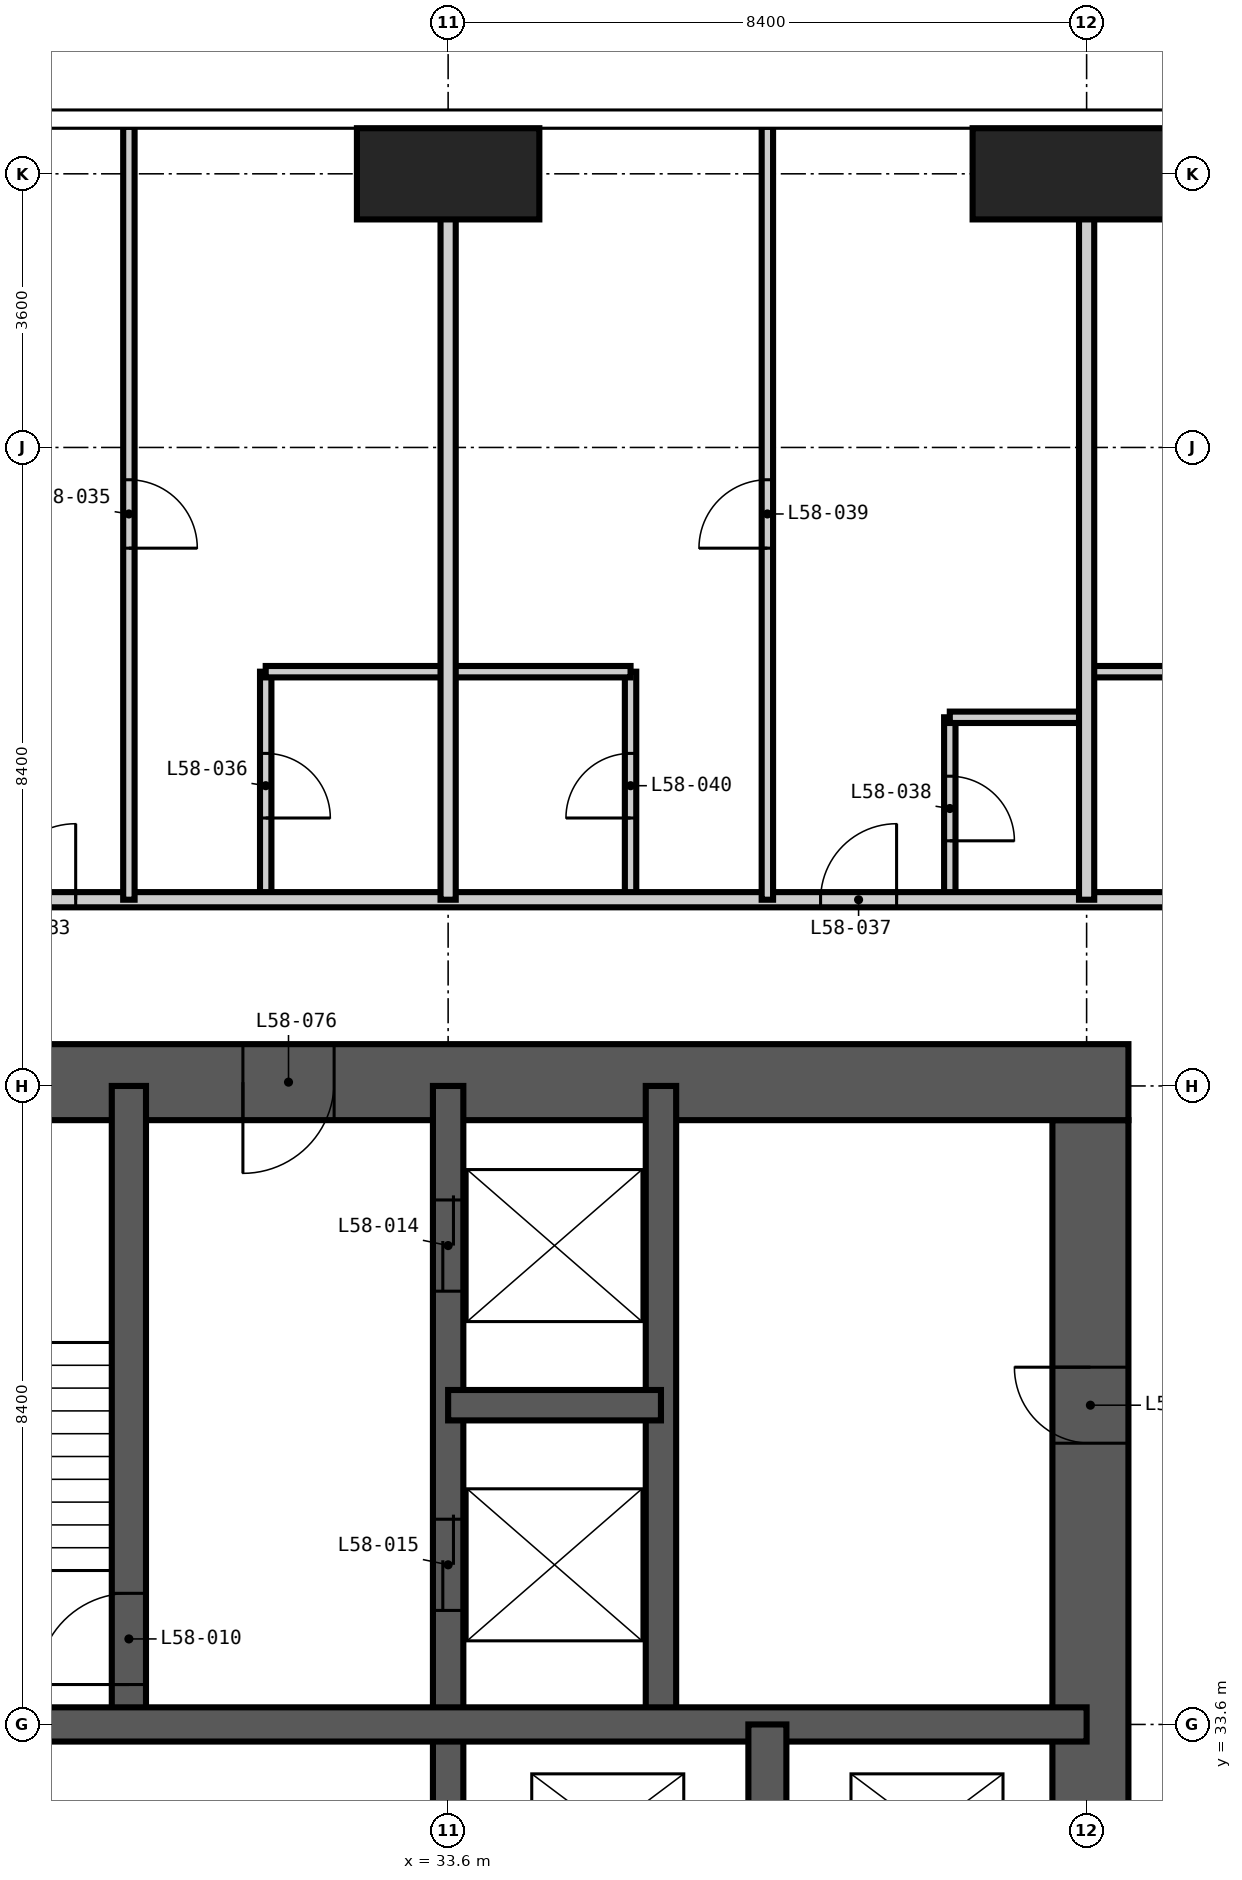
"""IFC4 building model, lengths in metres.
Left out: names, types, materials, properties, quantities, classifications, styles, units other than length and angle.
Written with IfcOpenShell. Run it as: python <this file> out.ifc"""

import sys

from ifc_helpers import new_model, si_unit, direction, frame, frame_2d, origin, origin_2d, place, context, subcontext, project, spatial, rectangle, extrude, element, fill, save


model = new_model("IFC4")
c1 = context("Model", 3, precision=1e-05, world=origin(), true_north=direction((0.0, 1.0)))
c2 = subcontext(c1, "Body", "Model", "MODEL_VIEW")
j1 = project(units=[si_unit("LENGTHUNIT", "METRE"), si_unit("PLANEANGLEUNIT", "RADIAN")], contexts=[c1])
p1 = place(None, origin())
s1 = spatial("IfcSite", under=j1, at=p1, CompositionType="ELEMENT")
p2 = place(p1, origin())
s2 = spatial("IfcBuilding", under=s1, at=p2, CompositionType="ELEMENT")
p3 = place(p2, frame((0.0, 0.0, 225.6)))
s3 = spatial("IfcBuildingStorey", under=s2, at=p3, CompositionType="ELEMENT", Elevation=225.6)
p4 = place(p3, frame((33.6, 54.0, -0.35), z_axis=(0.0, 0.0, 1.0), x_axis=(1.0, 0.0, 0.0)))
e1 = element("IfcColumn", 1, at=p4, inside=s3, PredefinedType="COLUMN", context=c2, shape_type="SweptSolid", body=[
    extrude(rectangle(XDim=2.4, YDim=1.2, at=origin_2d()), origin(), (0.0, 0.0, 1.0), 3.9),
])
p5 = place(p3, frame((42.0, 54.0, -0.35), z_axis=(0.0, 0.0, 1.0), x_axis=(1.0, 0.0, 0.0)))
e2 = element("IfcColumn", 2, at=p5, inside=s3, PredefinedType="COLUMN", context=c2, shape_type="SweptSolid", body=[
    extrude(rectangle(XDim=3.0, YDim=1.2, at=origin_2d()), origin(), (0.0, 0.0, 1.0), 3.9),
])
p6 = place(p3, frame((42.05, 17.25, -0.35), z_axis=(0.0, 0.0, 1.0), x_axis=(0.0, 1.0, 0.0)))
e3 = element("IfcWall", 3, at=p6, inside=s3, PredefinedType="SHEAR", context=c2, shape_type="SweptSolid", body=[
    extrude(rectangle(XDim=24.3, YDim=1.0, at=frame_2d((12.15, 0.0))), origin(), (0.0, 0.0, 1.0), 3.9),
])
p7 = place(p6, frame((0.35, 0.0, 0.35)))
e4 = element("IfcOpeningElement", 4, at=p7, cuts=e3, PredefinedType="OPENING", context=c2, shape_type="SweptSolid", body=[
    extrude(rectangle(XDim=1.2, YDim=2.2, at=frame_2d((0.6, 1.1))), frame((0.0, 0.51, 0.0), z_axis=(0.0, -1.0, 0.0), x_axis=(1.0, 0.0, 0.0)), (0.0, 0.0, 1.0), 1.02),
])
p8 = place(p6, frame((11.25, 0.0, 0.35)))
e5 = element("IfcOpeningElement", 5, at=p8, cuts=e3, PredefinedType="OPENING", context=c2, shape_type="SweptSolid", body=[
    extrude(rectangle(XDim=1.8, YDim=2.2, at=frame_2d((0.9, 1.1))), frame((0.0, 0.51, 0.0), z_axis=(0.0, -1.0, 0.0), x_axis=(1.0, 0.0, 0.0)), (0.0, 0.0, 1.0), 1.02),
])
p9 = place(p6, frame((20.05, 0.0, 0.35)))
e6 = element("IfcOpeningElement", 6, at=p9, cuts=e3, PredefinedType="OPENING", context=c2, shape_type="SweptSolid", body=[
    extrude(rectangle(XDim=1.0, YDim=2.1, at=frame_2d((0.5, 1.05))), frame((0.0, 0.51, 0.0), z_axis=(0.0, -1.0, 0.0), x_axis=(1.0, 0.0, 0.0)), (0.0, 0.0, 1.0), 1.02),
])
p10 = place(p3, frame((42.55, 42.05, -0.35), z_axis=(0.0, 0.0, 1.0), x_axis=(-1.0, 0.0, 0.0)))
e7 = element("IfcWall", 7, at=p10, inside=s3, PredefinedType="SHEAR", context=c2, shape_type="SweptSolid", body=[
    extrude(rectangle(XDim=18.125, YDim=1.0, at=frame_2d((9.062, 0.0))), origin(), (0.0, 0.0, 1.0), 3.9),
])
p11 = place(p10, frame((10.45, 0.0, 0.35)))
e8 = element("IfcOpeningElement", 8, at=p11, cuts=e7, PredefinedType="OPENING", context=c2, shape_type="SweptSolid", body=[
    extrude(rectangle(XDim=1.2, YDim=2.2, at=frame_2d((0.6, 1.1))), frame((0.0, 0.51, 0.0), z_axis=(0.0, -1.0, 0.0), x_axis=(1.0, 0.0, 0.0)), (0.0, 0.0, 1.0), 1.02),
])
p12 = place(p3, frame((33.6, 16.8, -0.35), z_axis=(0.0, 0.0, 1.0), x_axis=(0.0, 1.0, 0.0)))
e9 = element("IfcWall", 9, at=p12, inside=s3, PredefinedType="SHEAR", context=c2, shape_type="SweptSolid", body=[
    extrude(rectangle(XDim=25.2, YDim=0.4, at=frame_2d((12.6, 0.0))), origin(), (0.0, 0.0, 1.0), 3.9),
])
p13 = place(p12, frame((22.5, 0.0, 0.35)))
e10 = element("IfcOpeningElement", 10, at=p13, cuts=e9, PredefinedType="OPENING", context=c2, shape_type="SweptSolid", body=[
    extrude(rectangle(XDim=1.2, YDim=2.2, at=frame_2d((0.6, 1.1))), frame((0.0, 0.21, 0.0), z_axis=(0.0, -1.0, 0.0), x_axis=(1.0, 0.0, 0.0)), (0.0, 0.0, 1.0), 0.42),
])
p14 = place(p12, frame((18.3, 0.0, 0.35)))
e11 = element("IfcOpeningElement", 11, at=p14, cuts=e9, PredefinedType="OPENING", context=c2, shape_type="SweptSolid", body=[
    extrude(rectangle(XDim=1.2, YDim=2.2, at=frame_2d((0.6, 1.1))), frame((0.0, 0.21, 0.0), z_axis=(0.0, -1.0, 0.0), x_axis=(1.0, 0.0, 0.0)), (0.0, 0.0, 1.0), 0.42),
])
p15 = place(p12, frame((9.3, 0.0, 0.35)))
e12 = element("IfcOpeningElement", 12, at=p15, cuts=e9, PredefinedType="OPENING", context=c2, shape_type="SweptSolid", body=[
    extrude(rectangle(XDim=1.0, YDim=2.1, at=frame_2d((0.5, 1.05))), frame((0.0, 0.21, 0.0), z_axis=(0.0, -1.0, 0.0), x_axis=(1.0, 0.0, 0.0)), (0.0, 0.0, 1.0), 0.42),
])
p16 = place(p3, frame((36.4, 33.6, -0.35), z_axis=(0.0, 0.0, 1.0), x_axis=(0.0, 1.0, 0.0)))
e13 = element("IfcWall", 13, at=p16, inside=s3, PredefinedType="SHEAR", context=c2, shape_type="SweptSolid", body=[
    extrude(rectangle(XDim=8.4, YDim=0.4, at=frame_2d((4.2, 0.0))), origin(), (0.0, 0.0, 1.0), 3.9),
])
p17 = place(p3, frame((33.6, 37.8, -0.35), z_axis=(0.0, 0.0, 1.0), x_axis=(1.0, 0.0, 0.0)))
e14 = element("IfcWall", 14, at=p17, inside=s3, PredefinedType="SHEAR", context=c2, shape_type="SweptSolid", body=[
    extrude(rectangle(XDim=2.8, YDim=0.4, at=frame_2d((1.4, 0.0))), origin(), (0.0, 0.0, 1.0), 3.9),
])
p18 = place(p3, frame((29.4, 33.6, -0.35), z_axis=(0.0, 0.0, 1.0), x_axis=(0.0, 1.0, 0.0)))
e15 = element("IfcWall", 15, at=p18, inside=s3, PredefinedType="SHEAR", context=c2, shape_type="SweptSolid", body=[
    extrude(rectangle(XDim=8.4, YDim=0.45, at=frame_2d((4.2, 0.0))), origin(), (0.0, 0.0, 1.0), 3.9),
])
p19 = place(p18, frame((0.525, 0.0, 0.35)))
e16 = element("IfcOpeningElement", 16, at=p19, cuts=e15, PredefinedType="OPENING", context=c2, shape_type="SweptSolid", body=[
    extrude(rectangle(XDim=1.2, YDim=2.2, at=frame_2d((0.6, 1.1))), frame((0.0, 0.235, 0.0), z_axis=(0.0, -1.0, 0.0), x_axis=(1.0, 0.0, 0.0)), (0.0, 0.0, 1.0), 0.47),
])
p20 = place(p3, frame((25.2, 33.6, -0.35), z_axis=(0.0, 0.0, 1.0), x_axis=(1.0, 0.0, 0.0)))
e17 = element("IfcWall", 17, at=p20, inside=s3, PredefinedType="SHEAR", context=c2, shape_type="SweptSolid", body=[
    extrude(rectangle(XDim=16.8, YDim=0.45, at=frame_2d((8.4, 0.0))), origin(), (0.0, 0.0, 1.0), 3.9),
])
p21 = place(p3, frame((37.8, 30.8, -0.35), z_axis=(0.0, 0.0, 1.0), x_axis=(0.0, 1.0, 0.0)))
e18 = element("IfcWall", 18, at=p21, inside=s3, PredefinedType="SHEAR", context=c2, shape_type="SweptSolid", body=[
    extrude(rectangle(XDim=2.8, YDim=0.5, at=frame_2d((1.4, 0.0))), origin(), (0.0, 0.0, 1.0), 3.9),
])
p22 = place(p3, frame((31.2, 44.45, 0.0), z_axis=(0.0, 0.0, 1.0), x_axis=(0.0, 1.0, 0.0)))
e19 = element("IfcWall", 19, at=p22, inside=s3, PredefinedType="PARTITIONING", context=c2, shape_type="SweptSolid", body=[
    extrude(rectangle(XDim=3.0, YDim=0.15, at=frame_2d((1.5, 0.0))), origin(), (0.0, 0.0, 1.0), 3.55),
])
p23 = place(p22, frame((1.075, 0.0, 0.0)))
e20 = element("IfcOpeningElement", 20, at=p23, cuts=e19, PredefinedType="OPENING", context=c2, shape_type="SweptSolid", body=[
    extrude(rectangle(XDim=0.85, YDim=2.1, at=frame_2d((0.425, 1.05))), frame((0.0, 0.085, 0.0), z_axis=(0.0, -1.0, 0.0), x_axis=(1.0, 0.0, 0.0)), (0.0, 0.0, 1.0), 0.17),
])
p24 = place(p3, frame((36.0, 44.45, 0.0), z_axis=(0.0, 0.0, 1.0), x_axis=(0.0, 1.0, 0.0)))
e21 = element("IfcWall", 21, at=p24, inside=s3, PredefinedType="PARTITIONING", context=c2, shape_type="SweptSolid", body=[
    extrude(rectangle(XDim=3.0, YDim=0.15, at=frame_2d((1.5, 0.0))), origin(), (0.0, 0.0, 1.0), 3.55),
])
p25 = place(p24, frame((1.075, 0.0, 0.0)))
e22 = element("IfcOpeningElement", 22, at=p25, cuts=e21, PredefinedType="OPENING", context=c2, shape_type="SweptSolid", body=[
    extrude(rectangle(XDim=0.85, YDim=2.1, at=frame_2d((0.425, 1.05))), frame((0.0, 0.085, 0.0), z_axis=(0.0, -1.0, 0.0), x_axis=(1.0, 0.0, 0.0)), (0.0, 0.0, 1.0), 0.17),
])
p26 = place(p3, frame((40.2, 44.45, 0.0), z_axis=(0.0, 0.0, 1.0), x_axis=(0.0, 1.0, 0.0)))
e23 = element("IfcWall", 23, at=p26, inside=s3, PredefinedType="PARTITIONING", context=c2, shape_type="SweptSolid", body=[
    extrude(rectangle(XDim=2.4, YDim=0.15, at=frame_2d((1.2, 0.0))), origin(), (0.0, 0.0, 1.0), 3.55),
])
p27 = place(p26, frame((0.775, 0.0, 0.0)))
e24 = element("IfcOpeningElement", 24, at=p27, cuts=e23, PredefinedType="OPENING", context=c2, shape_type="SweptSolid", body=[
    extrude(rectangle(XDim=0.85, YDim=2.1, at=frame_2d((0.425, 1.05))), frame((0.0, 0.085, 0.0), z_axis=(0.0, -1.0, 0.0), x_axis=(1.0, 0.0, 0.0)), (0.0, 0.0, 1.0), 0.17),
])
p28 = place(p3, frame((40.2, 46.85, 0.0), z_axis=(0.0, 0.0, 1.0), x_axis=(1.0, 0.0, 0.0)))
e25 = element("IfcWall", 25, at=p28, inside=s3, PredefinedType="PARTITIONING", context=c2, shape_type="SweptSolid", body=[
    extrude(rectangle(XDim=1.8, YDim=0.15, at=frame_2d((0.9, 0.0))), origin(), (0.0, 0.0, 1.0), 3.55),
])
p29 = place(p3, frame((31.2, 47.45, 0.0), z_axis=(0.0, 0.0, 1.0), x_axis=(1.0, 0.0, 0.0)))
e26 = element("IfcWall", 26, at=p29, inside=s3, PredefinedType="PARTITIONING", context=c2, shape_type="SweptSolid", body=[
    extrude(rectangle(XDim=4.8, YDim=0.15, at=frame_2d((2.4, 0.0))), origin(), (0.0, 0.0, 1.0), 3.55),
])
p30 = place(p3, frame((42.0, 47.45, 0.0), z_axis=(0.0, 0.0, 1.0), x_axis=(1.0, 0.0, 0.0)))
e27 = element("IfcWall", 27, at=p30, inside=s3, PredefinedType="PARTITIONING", context=c2, shape_type="SweptSolid", body=[
    extrude(rectangle(XDim=3.65, YDim=0.15, at=frame_2d((1.825, 0.0))), origin(), (0.0, 0.0, 1.0), 3.55),
])
p31 = place(p30, frame((1.4, 0.0, 0.0)))
e28 = element("IfcOpeningElement", 28, at=p31, cuts=e27, PredefinedType="OPENING", context=c2, shape_type="SweptSolid", body=[
    extrude(rectangle(XDim=0.85, YDim=2.1, at=frame_2d((0.425, 1.05))), frame((0.0, 0.085, 0.0), z_axis=(0.0, -1.0, 0.0), x_axis=(1.0, 0.0, 0.0)), (0.0, 0.0, 1.0), 0.17),
])
p32 = place(p3, frame((21.925, 44.45, 0.0), z_axis=(0.0, 0.0, 1.0), x_axis=(1.0, 0.0, 0.0)))
e29 = element("IfcWall", 29, at=p32, inside=s3, PredefinedType="PARTITIONING", context=c2, shape_type="SweptSolid", body=[
    extrude(rectangle(XDim=23.725, YDim=0.2, at=frame_2d((11.862, 0.0))), origin(), (0.0, 0.0, 1.0), 3.55),
])
p33 = place(p32, frame((5.775, 0.0, 0.0)))
e30 = element("IfcOpeningElement", 30, at=p33, cuts=e29, PredefinedType="OPENING", context=c2, shape_type="SweptSolid", body=[
    extrude(rectangle(XDim=1.0, YDim=2.2, at=frame_2d((0.5, 1.1))), frame((0.0, 0.11, 0.0), z_axis=(0.0, -1.0, 0.0), x_axis=(1.0, 0.0, 0.0)), (0.0, 0.0, 1.0), 0.22),
])
p34 = place(p32, frame((16.575, 0.0, 0.0)))
e31 = element("IfcOpeningElement", 31, at=p34, cuts=e29, PredefinedType="OPENING", context=c2, shape_type="SweptSolid", body=[
    extrude(rectangle(XDim=1.0, YDim=2.2, at=frame_2d((0.5, 1.1))), frame((0.0, 0.11, 0.0), z_axis=(0.0, -1.0, 0.0), x_axis=(1.0, 0.0, 0.0)), (0.0, 0.0, 1.0), 0.22),
])
for number, where, z_axis, x_axis in (
    (32, (33.6, 44.45, 0.0), (0.0, 0.0, 1.0), (0.0, 1.0, 0.0)),
    (33, (42.0, 44.45, 0.0), (0.0, 0.0, 1.0), (0.0, 1.0, 0.0)),
):
    element("IfcWall", number, at=place(p3, frame(where, z_axis=z_axis, x_axis=x_axis)), inside=s3, PredefinedType="PARTITIONING", context=c2, shape_type="SweptSolid", body=[
        extrude(rectangle(XDim=10.168, YDim=0.2, at=frame_2d((5.084, 0.0))), origin(), (0.0, 0.0, 1.0), 3.55),
    ])
p35 = place(p3, frame((29.4, 44.45, 0.0), z_axis=(0.0, 0.0, 1.0), x_axis=(0.0, 1.0, 0.0)))
e34 = element("IfcWall", 34, at=p35, inside=s3, PredefinedType="PARTITIONING", context=c2, shape_type="SweptSolid", body=[
    extrude(rectangle(XDim=10.168, YDim=0.15, at=frame_2d((5.084, 0.0))), origin(), (0.0, 0.0, 1.0), 3.55),
])
p36 = place(p35, frame((4.625, 0.0, 0.0)))
e35 = element("IfcOpeningElement", 35, at=p36, cuts=e34, PredefinedType="OPENING", context=c2, shape_type="SweptSolid", body=[
    extrude(rectangle(XDim=0.9, YDim=2.1, at=frame_2d((0.45, 1.05))), frame((0.0, 0.085, 0.0), z_axis=(0.0, -1.0, 0.0), x_axis=(1.0, 0.0, 0.0)), (0.0, 0.0, 1.0), 0.17),
])
p37 = place(p3, frame((37.8, 44.45, 0.0), z_axis=(0.0, 0.0, 1.0), x_axis=(0.0, 1.0, 0.0)))
e36 = element("IfcWall", 36, at=p37, inside=s3, PredefinedType="PARTITIONING", context=c2, shape_type="SweptSolid", body=[
    extrude(rectangle(XDim=10.168, YDim=0.15, at=frame_2d((5.084, 0.0))), origin(), (0.0, 0.0, 1.0), 3.55),
])
p38 = place(p37, frame((4.625, 0.0, 0.0)))
e37 = element("IfcOpeningElement", 37, at=p38, cuts=e36, PredefinedType="OPENING", context=c2, shape_type="SweptSolid", body=[
    extrude(rectangle(XDim=0.9, YDim=2.1, at=frame_2d((0.45, 1.05))), frame((0.0, 0.085, 0.0), z_axis=(0.0, -1.0, 0.0), x_axis=(1.0, 0.0, 0.0)), (0.0, 0.0, 1.0), 0.17),
])
p39 = place(p19, origin())
e38 = element("IfcDoor", 38, at=p39, inside=s3, OperationType="SINGLE_SWING_LEFT", PredefinedType="DOOR", context=c2, shape_type="SweptSolid", body=[
    extrude(rectangle(XDim=1.2, YDim=2.2, at=frame_2d((0.6, 1.1))), frame((0.0, 0.025, 0.0), z_axis=(0.0, -1.0, 0.0), x_axis=(1.0, 0.0, 0.0)), (0.0, 0.0, 1.0), 0.05),
])
fill(e16, e38)
p40 = place(p13, origin())
e39 = element("IfcDoor", 39, at=p40, inside=s3, OperationType="DOUBLE_DOOR_SLIDING", PredefinedType="DOOR", context=c2, shape_type="SweptSolid", body=[
    extrude(rectangle(XDim=1.2, YDim=2.2, at=frame_2d((0.6, 1.1))), frame((0.0, 0.025, 0.0), z_axis=(0.0, -1.0, 0.0), x_axis=(1.0, 0.0, 0.0)), (0.0, 0.0, 1.0), 0.05),
])
fill(e10, e39)
p41 = place(p14, origin())
e40 = element("IfcDoor", 40, at=p41, inside=s3, OperationType="DOUBLE_DOOR_SLIDING", PredefinedType="DOOR", context=c2, shape_type="SweptSolid", body=[
    extrude(rectangle(XDim=1.2, YDim=2.2, at=frame_2d((0.6, 1.1))), frame((0.0, 0.025, 0.0), z_axis=(0.0, -1.0, 0.0), x_axis=(1.0, 0.0, 0.0)), (0.0, 0.0, 1.0), 0.05),
])
fill(e11, e40)
p42 = place(p33, origin())
e41 = element("IfcDoor", 41, at=p42, inside=s3, OperationType="SINGLE_SWING_RIGHT", PredefinedType="DOOR", context=c2, shape_type="SweptSolid", body=[
    extrude(rectangle(XDim=1.0, YDim=2.2, at=frame_2d((0.5, 1.1))), frame((0.0, 0.025, 0.0), z_axis=(0.0, -1.0, 0.0), x_axis=(1.0, 0.0, 0.0)), (0.0, 0.0, 1.0), 0.05),
])
fill(e30, e41)
p43 = place(p36, frame((0.9, 0.0, 0.0), z_axis=(0.0, 0.0, 1.0), x_axis=(-1.0, 0.0, 0.0)))
e42 = element("IfcDoor", 42, at=p43, inside=s3, OperationType="SINGLE_SWING_RIGHT", PredefinedType="DOOR", context=c2, shape_type="SweptSolid", body=[
    extrude(rectangle(XDim=0.9, YDim=2.1, at=frame_2d((0.45, 1.05))), frame((0.0, 0.025, 0.0), z_axis=(0.0, -1.0, 0.0), x_axis=(1.0, 0.0, 0.0)), (0.0, 0.0, 1.0), 0.05),
])
fill(e35, e42)
p44 = place(p23, frame((0.85, 0.0, 0.0), z_axis=(0.0, 0.0, 1.0), x_axis=(-1.0, 0.0, 0.0)))
e43 = element("IfcDoor", 43, at=p44, inside=s3, OperationType="SINGLE_SWING_RIGHT", PredefinedType="DOOR", context=c2, shape_type="SweptSolid", body=[
    extrude(rectangle(XDim=0.85, YDim=2.1, at=frame_2d((0.425, 1.05))), frame((0.0, 0.025, 0.0), z_axis=(0.0, -1.0, 0.0), x_axis=(1.0, 0.0, 0.0)), (0.0, 0.0, 1.0), 0.05),
])
fill(e20, e43)
p45 = place(p34, origin())
e44 = element("IfcDoor", 44, at=p45, inside=s3, OperationType="SINGLE_SWING_RIGHT", PredefinedType="DOOR", context=c2, shape_type="SweptSolid", body=[
    extrude(rectangle(XDim=1.0, YDim=2.2, at=frame_2d((0.5, 1.1))), frame((0.0, 0.025, 0.0), z_axis=(0.0, -1.0, 0.0), x_axis=(1.0, 0.0, 0.0)), (0.0, 0.0, 1.0), 0.05),
])
fill(e31, e44)
p46 = place(p27, frame((0.85, 0.0, 0.0), z_axis=(0.0, 0.0, 1.0), x_axis=(-1.0, 0.0, 0.0)))
e45 = element("IfcDoor", 45, at=p46, inside=s3, OperationType="SINGLE_SWING_RIGHT", PredefinedType="DOOR", context=c2, shape_type="SweptSolid", body=[
    extrude(rectangle(XDim=0.85, YDim=2.1, at=frame_2d((0.425, 1.05))), frame((0.0, 0.025, 0.0), z_axis=(0.0, -1.0, 0.0), x_axis=(1.0, 0.0, 0.0)), (0.0, 0.0, 1.0), 0.05),
])
fill(e24, e45)
p47 = place(p38, origin())
e46 = element("IfcDoor", 46, at=p47, inside=s3, OperationType="SINGLE_SWING_LEFT", PredefinedType="DOOR", context=c2, shape_type="SweptSolid", body=[
    extrude(rectangle(XDim=0.9, YDim=2.1, at=frame_2d((0.45, 1.05))), frame((0.0, 0.025, 0.0), z_axis=(0.0, -1.0, 0.0), x_axis=(1.0, 0.0, 0.0)), (0.0, 0.0, 1.0), 0.05),
])
fill(e37, e46)
p48 = place(p25, origin())
e47 = element("IfcDoor", 47, at=p48, inside=s3, OperationType="SINGLE_SWING_LEFT", PredefinedType="DOOR", context=c2, shape_type="SweptSolid", body=[
    extrude(rectangle(XDim=0.85, YDim=2.1, at=frame_2d((0.425, 1.05))), frame((0.0, 0.025, 0.0), z_axis=(0.0, -1.0, 0.0), x_axis=(1.0, 0.0, 0.0)), (0.0, 0.0, 1.0), 0.05),
])
fill(e22, e47)
p49 = place(p11, origin())
e48 = element("IfcDoor", 48, at=p49, inside=s3, OperationType="SINGLE_SWING_RIGHT", PredefinedType="DOOR", context=c2, shape_type="SweptSolid", body=[
    extrude(rectangle(XDim=1.2, YDim=2.2, at=frame_2d((0.6, 1.1))), frame((0.0, 0.025, 0.0), z_axis=(0.0, -1.0, 0.0), x_axis=(1.0, 0.0, 0.0)), (0.0, 0.0, 1.0), 0.05),
])
fill(e8, e48)
p50 = place(p9, origin())
e49 = element("IfcDoor", 49, at=p50, inside=s3, OperationType="SINGLE_SWING_RIGHT", PredefinedType="DOOR", context=c2, shape_type="SweptSolid", body=[
    extrude(rectangle(XDim=1.0, YDim=2.1, at=frame_2d((0.5, 1.05))), frame((0.0, 0.025, 0.0), z_axis=(0.0, -1.0, 0.0), x_axis=(1.0, 0.0, 0.0)), (0.0, 0.0, 1.0), 0.05),
])
fill(e6, e49)
save(model, sys.argv[1])
